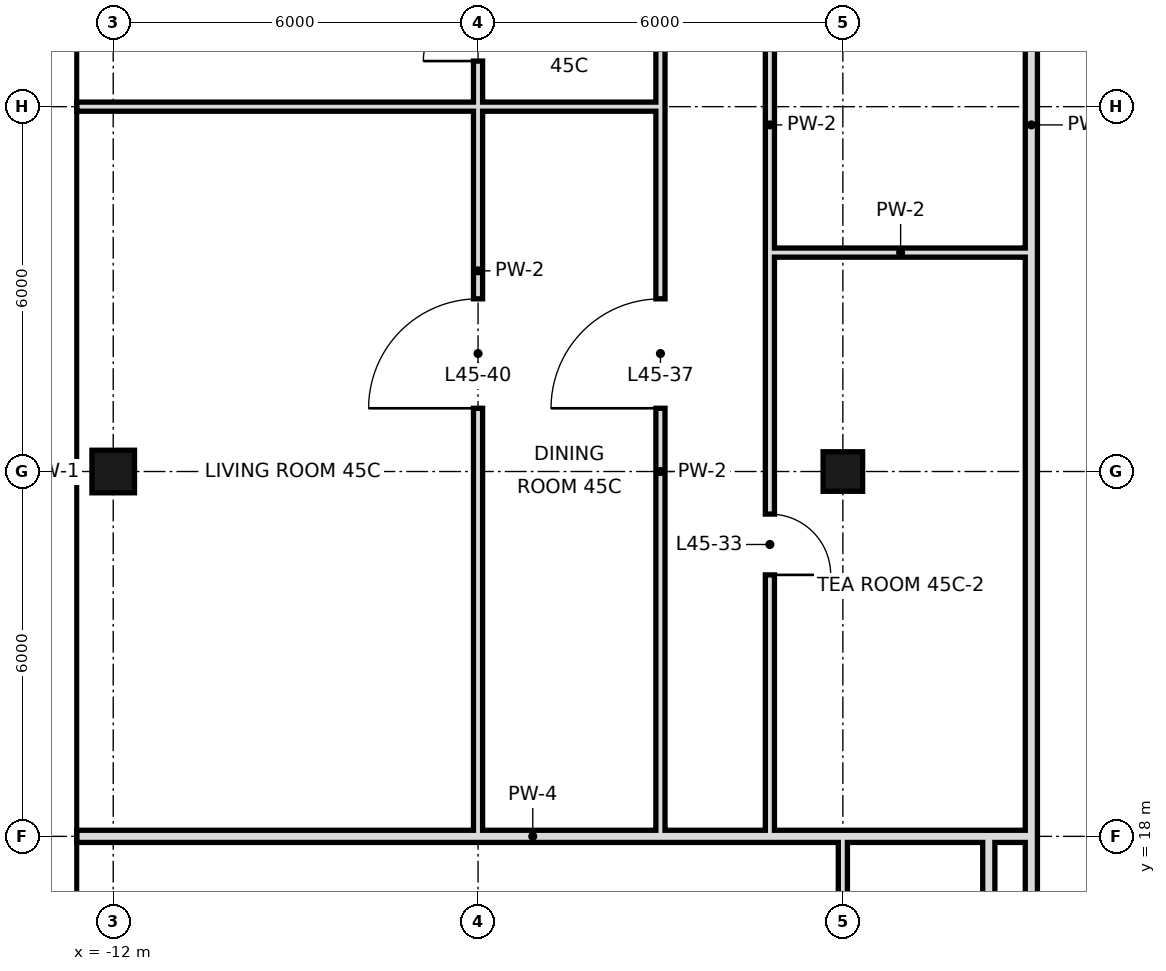
"""IFC4 building model, lengths in metres.
Left out: names, types, materials, properties, quantities, classifications, styles, units other than length and angle.
Written with IfcOpenShell. Run it as: python <this file> out.ifc"""

import sys

from ifc_helpers import new_model, si_unit, direction, frame, frame_2d, origin, origin_2d, place, context, subcontext, project, spatial, rectangle, hollow_rectangle, extrude, element, fill, save


model = new_model("IFC4")
c1 = context("Model", 3, precision=1e-05, world=origin(), true_north=direction((0.0, 1.0)))
c2 = subcontext(c1, "Body", "Model", "MODEL_VIEW")
j1 = project(units=[si_unit("LENGTHUNIT", "METRE"), si_unit("PLANEANGLEUNIT", "RADIAN")], contexts=[c1])
p1 = place(None, origin())
s1 = spatial("IfcSite", under=j1, at=p1, CompositionType="ELEMENT")
p2 = place(p1, origin())
s2 = spatial("IfcBuilding", under=s1, at=p2, CompositionType="ELEMENT")
p3 = place(p2, frame((0.0, 0.0, 195.6)))
s3 = spatial("IfcBuildingStorey", under=s2, at=p3, CompositionType="ELEMENT", Elevation=195.6)
p4 = place(p3, frame((-12.0, 24.0, 0.0), z_axis=(0.0, 0.0, 1.0), x_axis=(1.0, 0.0, 0.0)))
e1 = element("IfcColumn", 1, at=p4, inside=s3, PredefinedType="COLUMN", context=c2, shape_type="SweptSolid", body=[
    extrude(hollow_rectangle(XDim=0.7, YDim=0.7, WallThickness=0.036, at=origin_2d()), origin(), (0.0, 0.0, 1.0), 3.6),
])
p5 = place(p3, frame((0.0, 24.0, 0.0), z_axis=(0.0, 0.0, 1.0), x_axis=(1.0, 0.0, 0.0)))
e2 = element("IfcColumn", 2, at=p5, inside=s3, PredefinedType="COLUMN", context=c2, shape_type="SweptSolid", body=[
    extrude(hollow_rectangle(XDim=0.65, YDim=0.65, WallThickness=0.032, at=origin_2d()), origin(), (0.0, 0.0, 1.0), 3.6),
])
p6 = place(p3, frame((-1.2, 18.0, 0.0), z_axis=(0.0, 0.0, 1.0), x_axis=(0.0, 1.0, 0.0)))
e3 = element("IfcWall", 3, at=p6, inside=s3, PredefinedType="PARTITIONING", context=c2, shape_type="SweptSolid", body=[
    extrude(rectangle(XDim=23.4, YDim=0.15, at=frame_2d((11.7, 0.0))), origin(), (0.0, 0.0, 1.0), 3.42),
])
p7 = place(p6, frame((20.5, 0.0, 0.0)))
e4 = element("IfcOpeningElement", 4, at=p7, cuts=e3, PredefinedType="OPENING", context=c2, shape_type="SweptSolid", body=[
    extrude(rectangle(XDim=1.0, YDim=2.4, at=frame_2d((0.5, 1.2))), frame((0.0, 0.085, 0.0), z_axis=(0.0, -1.0, 0.0), x_axis=(1.0, 0.0, 0.0)), (0.0, 0.0, 1.0), 0.17),
])
p8 = place(p6, frame((4.3, 0.0, 0.0)))
e5 = element("IfcOpeningElement", 5, at=p8, cuts=e3, PredefinedType="OPENING", context=c2, shape_type="SweptSolid", body=[
    extrude(rectangle(XDim=1.0, YDim=2.4, at=frame_2d((0.5, 1.2))), frame((0.0, 0.085, 0.0), z_axis=(0.0, -1.0, 0.0), x_axis=(1.0, 0.0, 0.0)), (0.0, 0.0, 1.0), 0.17),
])
p9 = place(p6, frame((15.1, 0.0, 0.0)))
e6 = element("IfcOpeningElement", 6, at=p9, cuts=e3, PredefinedType="OPENING", context=c2, shape_type="SweptSolid", body=[
    extrude(rectangle(XDim=1.0, YDim=2.4, at=frame_2d((0.5, 1.2))), frame((0.0, 0.085, 0.0), z_axis=(0.0, -1.0, 0.0), x_axis=(1.0, 0.0, 0.0)), (0.0, 0.0, 1.0), 0.17),
])
p10 = place(p3, frame((-3.0, 18.0, 0.0), z_axis=(0.0, 0.0, 1.0), x_axis=(0.0, 1.0, 0.0)))
e7 = element("IfcWall", 7, at=p10, inside=s3, PredefinedType="PARTITIONING", context=c2, shape_type="SweptSolid", body=[
    extrude(rectangle(XDim=12.0, YDim=0.15, at=frame_2d((6.0, 0.0))), origin(), (0.0, 0.0, 1.0), 3.42),
])
p11 = place(p10, frame((7.04, 0.0, 0.0)))
e8 = element("IfcOpeningElement", 8, at=p11, cuts=e7, PredefinedType="OPENING", context=c2, shape_type="SweptSolid", body=[
    extrude(rectangle(XDim=1.8, YDim=2.4, at=frame_2d((0.9, 1.2))), frame((0.0, 0.085, 0.0), z_axis=(0.0, -1.0, 0.0), x_axis=(1.0, 0.0, 0.0)), (0.0, 0.0, 1.0), 0.17),
])
p12 = place(p3, frame((-3.0, 30.0, 0.0), z_axis=(0.0, 0.0, 1.0), x_axis=(0.0, 1.0, 0.0)))
e9 = element("IfcWall", 9, at=p12, inside=s3, PredefinedType="PARTITIONING", context=c2, shape_type="SweptSolid", body=[
    extrude(rectangle(XDim=2.4, YDim=0.15, at=frame_2d((1.2, 0.0))), origin(), (0.0, 0.0, 1.0), 3.42),
])
p13 = place(p3, frame((-6.0, 18.0, 0.0), z_axis=(0.0, 0.0, 1.0), x_axis=(0.0, 1.0, 0.0)))
e10 = element("IfcWall", 10, at=p13, inside=s3, PredefinedType="PARTITIONING", context=c2, shape_type="SweptSolid", body=[
    extrude(rectangle(XDim=12.0, YDim=0.15, at=frame_2d((6.0, 0.0))), origin(), (0.0, 0.0, 1.0), 3.42),
])
p14 = place(p13, frame((7.04, 0.0, 0.0)))
e11 = element("IfcOpeningElement", 11, at=p14, cuts=e10, PredefinedType="OPENING", context=c2, shape_type="SweptSolid", body=[
    extrude(rectangle(XDim=1.8, YDim=2.4, at=frame_2d((0.9, 1.2))), frame((0.0, 0.085, 0.0), z_axis=(0.0, -1.0, 0.0), x_axis=(1.0, 0.0, 0.0)), (0.0, 0.0, 1.0), 0.17),
])
p15 = place(p3, frame((-6.0, 30.0, 0.0), z_axis=(0.0, 0.0, 1.0), x_axis=(0.0, 1.0, 0.0)))
e12 = element("IfcWall", 12, at=p15, inside=s3, PredefinedType="PARTITIONING", context=c2, shape_type="SweptSolid", body=[
    extrude(rectangle(XDim=2.4, YDim=0.15, at=frame_2d((1.2, 0.0))), origin(), (0.0, 0.0, 1.0), 3.42),
])
p16 = place(p15, frame((0.75, 0.0, 0.0)))
e13 = element("IfcOpeningElement", 13, at=p16, cuts=e12, PredefinedType="OPENING", context=c2, shape_type="SweptSolid", body=[
    extrude(rectangle(XDim=0.9, YDim=2.4, at=frame_2d((0.45, 1.2))), frame((0.0, 0.085, 0.0), z_axis=(0.0, -1.0, 0.0), x_axis=(1.0, 0.0, 0.0)), (0.0, 0.0, 1.0), 0.17),
])
p17 = place(p3, frame((0.0, 10.8, 0.0), z_axis=(0.0, 0.0, 1.0), x_axis=(0.0, 1.0, 0.0)))
e14 = element("IfcWall", 14, at=p17, inside=s3, PredefinedType="PARTITIONING", context=c2, shape_type="SweptSolid", body=[
    extrude(rectangle(XDim=7.2, YDim=0.15, at=frame_2d((3.6, 0.0))), origin(), (0.0, 0.0, 1.0), 2.72),
])
p18 = place(p3, frame((2.4, 10.8, 0.0), z_axis=(0.0, 0.0, 1.0), x_axis=(0.0, 1.0, 0.0)))
e15 = element("IfcWall", 15, at=p18, inside=s3, PredefinedType="SOLIDWALL", context=c2, shape_type="SweptSolid", body=[
    extrude(rectangle(XDim=7.2, YDim=0.2, at=frame_2d((3.6, 0.0))), origin(), (0.0, 0.0, 1.0), 2.72),
])
p19 = place(p3, frame((3.1, 18.0, 0.0), z_axis=(0.0, 0.0, 1.0), x_axis=(0.0, 1.0, 0.0)))
e16 = element("IfcWall", 16, at=p19, inside=s3, PredefinedType="SOLIDWALL", context=c2, shape_type="SweptSolid", body=[
    extrude(rectangle(XDim=23.4, YDim=0.2, at=frame_2d((11.7, 0.0))), origin(), (0.0, 0.0, 1.0), 2.97),
])
p20 = place(p19, frame((20.4, 0.0, 0.0)))
e17 = element("IfcOpeningElement", 17, at=p20, cuts=e16, PredefinedType="OPENING", context=c2, shape_type="SweptSolid", body=[
    extrude(rectangle(XDim=1.2, YDim=2.4, at=frame_2d((0.6, 1.2))), frame((0.0, 0.11, 0.0), z_axis=(0.0, -1.0, 0.0), x_axis=(1.0, 0.0, 0.0)), (0.0, 0.0, 1.0), 0.22),
])
p21 = place(p3, frame((3.1, 15.3, 0.0), z_axis=(0.0, 0.0, 1.0), x_axis=(0.0, 1.0, 0.0)))
e18 = element("IfcWall", 18, at=p21, inside=s3, PredefinedType="SOLIDWALL", context=c2, shape_type="SweptSolid", body=[
    extrude(rectangle(XDim=2.7, YDim=0.2, at=frame_2d((1.35, 0.0))), origin(), (0.0, 0.0, 1.0), 2.97),
])
p22 = place(p3, frame((2.4, 18.0, 0.0), z_axis=(0.0, 0.0, 1.0), x_axis=(1.0, 0.0, 0.0)))
e19 = element("IfcWall", 19, at=p22, inside=s3, PredefinedType="SOLIDWALL", context=c2, shape_type="SweptSolid", body=[
    extrude(rectangle(XDim=0.7, YDim=0.2, at=frame_2d((0.35, 0.0))), origin(), (0.0, 0.0, 1.0), 2.97),
])
p23 = place(p3, frame((-12.6, 18.0, 0.0), z_axis=(0.0, 0.0, 1.0), x_axis=(1.0, 0.0, 0.0)))
e20 = element("IfcWall", 20, at=p23, inside=s3, PredefinedType="SOLIDWALL", context=c2, shape_type="SweptSolid", body=[
    extrude(rectangle(XDim=15.0, YDim=0.2, at=frame_2d((7.5, 0.0))), origin(), (0.0, 0.0, 1.0), 2.72),
])
p24 = place(p3, frame((-1.2, 27.6, 0.0), z_axis=(0.0, 0.0, 1.0), x_axis=(1.0, 0.0, 0.0)))
e21 = element("IfcWall", 21, at=p24, inside=s3, PredefinedType="PARTITIONING", context=c2, shape_type="SweptSolid", body=[
    extrude(rectangle(XDim=4.3, YDim=0.15, at=frame_2d((2.15, 0.0))), origin(), (0.0, 0.0, 1.0), 3.42),
])
p25 = place(p3, frame((-12.6, 30.0, 0.0), z_axis=(0.0, 0.0, 1.0), x_axis=(1.0, 0.0, 0.0)))
e22 = element("IfcWall", 22, at=p25, inside=s3, PredefinedType="PARTITIONING", context=c2, shape_type="SweptSolid", body=[
    extrude(rectangle(XDim=6.6, YDim=0.15, at=frame_2d((3.3, 0.0))), origin(), (0.0, 0.0, 1.0), 2.72),
])
p26 = place(p3, frame((-6.0, 30.0, 0.0), z_axis=(0.0, 0.0, 1.0), x_axis=(1.0, 0.0, 0.0)))
e23 = element("IfcWall", 23, at=p26, inside=s3, PredefinedType="PARTITIONING", context=c2, shape_type="SweptSolid", body=[
    extrude(rectangle(XDim=3.0, YDim=0.15, at=frame_2d((1.5, 0.0))), origin(), (0.0, 0.0, 1.0), 2.72),
])
p27 = place(p8, frame((1.0, 0.0, 0.0), z_axis=(0.0, 0.0, 1.0), x_axis=(-1.0, 0.0, 0.0)))
e24 = element("IfcDoor", 24, at=p27, inside=s3, OperationType="SINGLE_SWING_RIGHT", PredefinedType="DOOR", context=c2, shape_type="SweptSolid", body=[
    extrude(rectangle(XDim=1.0, YDim=2.4, at=frame_2d((0.5, 1.2))), frame((0.0, 0.025, 0.0), z_axis=(0.0, -1.0, 0.0), x_axis=(1.0, 0.0, 0.0)), (0.0, 0.0, 1.0), 0.05),
])
fill(e5, e24)
p28 = place(p11, origin())
e25 = element("IfcDoor", 25, at=p28, inside=s3, OperationType="SINGLE_SWING_LEFT", PredefinedType="DOOR", context=c2, shape_type="SweptSolid", body=[
    extrude(rectangle(XDim=1.8, YDim=2.4, at=frame_2d((0.9, 1.2))), frame((0.0, 0.025, 0.0), z_axis=(0.0, -1.0, 0.0), x_axis=(1.0, 0.0, 0.0)), (0.0, 0.0, 1.0), 0.05),
])
fill(e8, e25)
p29 = place(p14, origin())
e26 = element("IfcDoor", 26, at=p29, inside=s3, OperationType="SINGLE_SWING_LEFT", PredefinedType="DOOR", context=c2, shape_type="SweptSolid", body=[
    extrude(rectangle(XDim=1.8, YDim=2.4, at=frame_2d((0.9, 1.2))), frame((0.0, 0.025, 0.0), z_axis=(0.0, -1.0, 0.0), x_axis=(1.0, 0.0, 0.0)), (0.0, 0.0, 1.0), 0.05),
])
fill(e11, e26)
p30 = place(p16, origin())
e27 = element("IfcDoor", 27, at=p30, inside=s3, OperationType="SINGLE_SWING_LEFT", PredefinedType="DOOR", context=c2, shape_type="SweptSolid", body=[
    extrude(rectangle(XDim=0.9, YDim=2.4, at=frame_2d((0.45, 1.2))), frame((0.0, 0.025, 0.0), z_axis=(0.0, -1.0, 0.0), x_axis=(1.0, 0.0, 0.0)), (0.0, 0.0, 1.0), 0.05),
])
fill(e13, e27)
save(model, sys.argv[1])
